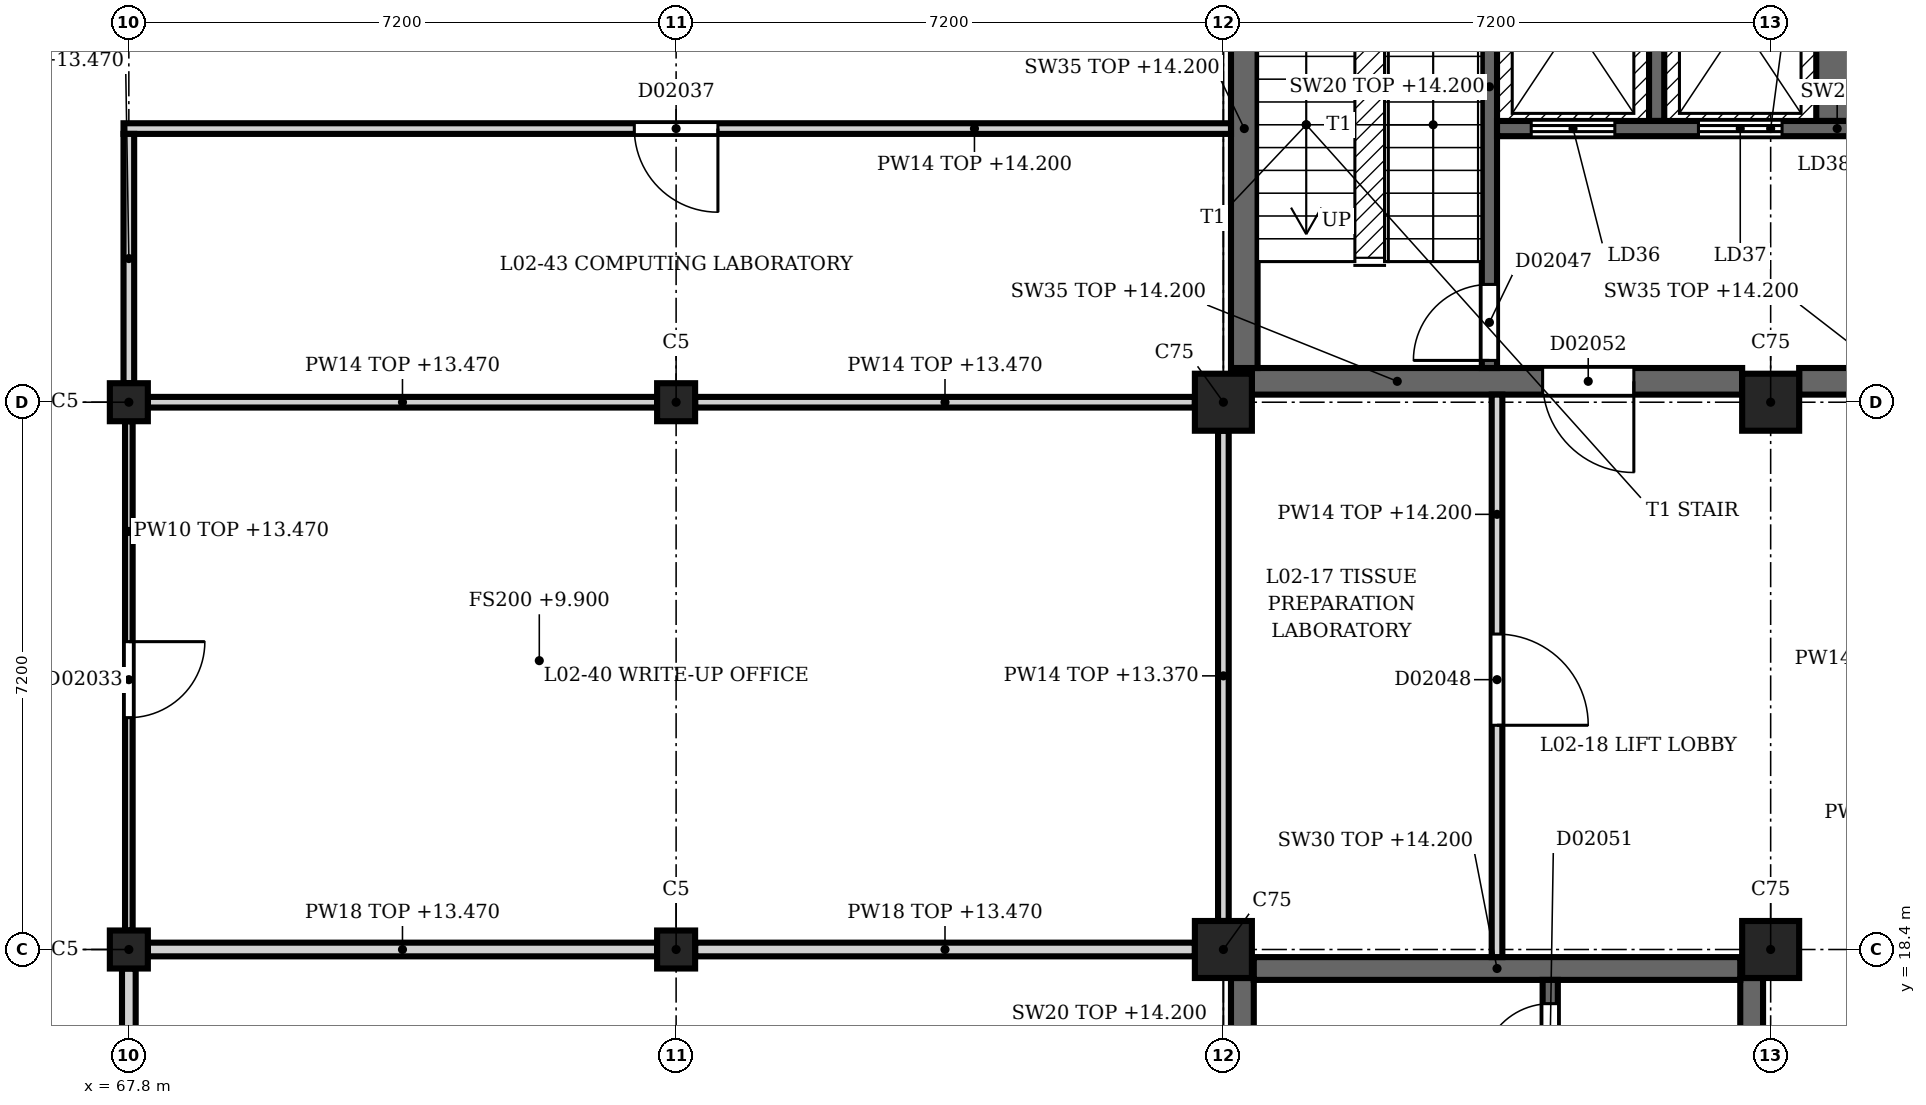
"""IFC4 building model, lengths in metres.
Left out: names, types, materials, properties, quantities, classifications, styles, units other than length and angle.
Written with IfcOpenShell. Run it as: python <this file> out.ifc"""

import sys

from ifc_helpers import new_model, si_unit, direction, frame, frame_2d, origin, origin_2d, place, context, subcontext, project, spatial, rectangle, extrude, element, fill, save


model = new_model("IFC4")
c1 = context("Model", 3, precision=1e-05, world=origin(), true_north=direction((0.0, 1.0)))
c2 = subcontext(c1, "Body", "Model", "MODEL_VIEW")
j1 = project(units=[si_unit("LENGTHUNIT", "METRE"), si_unit("PLANEANGLEUNIT", "RADIAN")], contexts=[c1])
p1 = place(None, origin())
s1 = spatial("IfcSite", under=j1, at=p1, CompositionType="ELEMENT")
p2 = place(p1, origin())
s2 = spatial("IfcBuilding", under=s1, at=p2, CompositionType="ELEMENT")
p3 = place(p2, frame((0.0, 0.0, 9.9)))
s3 = spatial("IfcBuildingStorey", under=s2, at=p3, CompositionType="ELEMENT", Elevation=9.9)
for number, where, z_axis, x_axis in (
    (1, (82.2, 18.4, 0.0), (0.0, 0.0, 1.0), (1.0, 0.0, 0.0)),
    (2, (82.2, 25.6, 0.0), (0.0, 0.0, 1.0), (1.0, 0.0, 0.0)),
    (3, (89.4, 18.4, 0.0), (0.0, 0.0, 1.0), (1.0, 0.0, 0.0)),
    (4, (89.4, 25.6, 0.0), (0.0, 0.0, 1.0), (1.0, 0.0, 0.0)),
):
    element("IfcColumn", number, at=place(p3, frame(where, z_axis=z_axis, x_axis=x_axis)), inside=s3, PredefinedType="COLUMN", context=c2, shape_type="SweptSolid", body=[
        extrude(rectangle(XDim=0.75, YDim=0.75, at=origin_2d()), origin(), (0.0, 0.0, 1.0), 4.5),
    ])
for number, where, z_axis, x_axis in (
    (5, (67.8, 18.4, 0.0), (0.0, 0.0, 1.0), (1.0, 0.0, 0.0)),
    (6, (67.8, 25.6, 0.0), (0.0, 0.0, 1.0), (1.0, 0.0, 0.0)),
    (7, (75.0, 18.4, 0.0), (0.0, 0.0, 1.0), (1.0, 0.0, 0.0)),
    (8, (75.0, 25.6, 0.0), (0.0, 0.0, 1.0), (1.0, 0.0, 0.0)),
):
    element("IfcColumn", number, at=place(p3, frame(where, z_axis=z_axis, x_axis=x_axis)), inside=s3, PredefinedType="COLUMN", context=c2, shape_type="SweptSolid", body=[
        extrude(rectangle(XDim=0.5, YDim=0.5, at=origin_2d()), origin(), (0.0, 0.0, 1.0), 4.5),
    ])
p4 = place(p3, frame((82.575, 25.875, 0.0), z_axis=(0.0, 0.0, 1.0), x_axis=(1.0, 0.0, 0.0)))
e9 = element("IfcWall", 9, at=p4, inside=s3, PredefinedType="SHEAR", context=c2, shape_type="SweptSolid", body=[
    extrude(rectangle(XDim=6.45, YDim=0.35, at=frame_2d((3.225, 0.0))), origin(), (0.0, 0.0, 1.0), 4.3),
])
p5 = place(p4, frame((3.825, 0.0, 0.0)))
e10 = element("IfcOpeningElement", 10, at=p5, cuts=e9, PredefinedType="OPENING", context=c2, shape_type="SweptSolid", body=[
    extrude(rectangle(XDim=1.2, YDim=2.1, at=frame_2d((0.6, 1.05))), frame((0.0, 0.185, 0.0), z_axis=(0.0, -1.0, 0.0), x_axis=(1.0, 0.0, 0.0)), (0.0, 0.0, 1.0), 0.37),
])
p6 = place(p3, frame((89.775, 25.875, 0.0), z_axis=(0.0, 0.0, 1.0), x_axis=(1.0, 0.0, 0.0)))
e11 = element("IfcWall", 11, at=p6, inside=s3, PredefinedType="SHEAR", context=c2, shape_type="SweptSolid", body=[
    extrude(rectangle(XDim=6.45, YDim=0.35, at=frame_2d((3.225, 0.0))), origin(), (0.0, 0.0, 1.0), 4.3),
])
p7 = place(p6, frame((2.625, 0.0, 0.0)))
e12 = element("IfcOpeningElement", 12, at=p7, cuts=e11, PredefinedType="OPENING", context=c2, shape_type="SweptSolid", body=[
    extrude(rectangle(XDim=1.8, YDim=2.1, at=frame_2d((0.9, 1.05))), frame((0.0, 0.185, 0.0), z_axis=(0.0, -1.0, 0.0), x_axis=(1.0, 0.0, 0.0)), (0.0, 0.0, 1.0), 0.37),
])
p8 = place(p3, frame((82.475, 26.05, 0.0), z_axis=(0.0, 0.0, 1.0), x_axis=(0.0, 1.0, 0.0)))
e13 = element("IfcWall", 13, at=p8, inside=s3, PredefinedType="SHEAR", context=c2, shape_type="SweptSolid", body=[
    extrude(rectangle(XDim=6.3, YDim=0.35, at=frame_2d((3.15, 0.0))), origin(), (0.0, 0.0, 1.0), 4.3),
])
p9 = place(p3, frame((85.7, 26.05, 0.0), z_axis=(0.0, 0.0, 1.0), x_axis=(0.0, 1.0, 0.0)))
e14 = element("IfcWall", 14, at=p9, inside=s3, PredefinedType="SHEAR", context=c2, shape_type="SweptSolid", body=[
    extrude(rectangle(XDim=6.3, YDim=0.2, at=frame_2d((3.15, 0.0))), origin(), (0.0, 0.0, 1.0), 4.3),
])
p10 = place(p9, frame((0.1, 0.0, 0.0)))
e15 = element("IfcOpeningElement", 15, at=p10, cuts=e14, PredefinedType="OPENING", context=c2, shape_type="SweptSolid", body=[
    extrude(rectangle(XDim=1.0, YDim=2.1, at=frame_2d((0.5, 1.05))), frame((0.0, 0.11, 0.0), z_axis=(0.0, -1.0, 0.0), x_axis=(1.0, 0.0, 0.0)), (0.0, 0.0, 1.0), 0.22),
])
p11 = place(p3, frame((96.15, 29.2, 0.0), z_axis=(0.0, 0.0, 1.0), x_axis=(-1.0, 0.0, 0.0)))
e16 = element("IfcWall", 16, at=p11, inside=s3, PredefinedType="SHEAR", context=c2, shape_type="SweptSolid", body=[
    extrude(rectangle(XDim=10.35, YDim=0.2, at=frame_2d((5.175, 0.0))), origin(), (0.0, 0.0, 1.0), 4.3),
])
p12 = place(p11, frame((8.8, 0.0, 0.0)))
e17 = element("IfcOpeningElement", 17, at=p12, cuts=e16, PredefinedType="OPENING", context=c2, shape_type="SweptSolid", body=[
    extrude(rectangle(XDim=1.1, YDim=2.1, at=frame_2d((0.55, 1.05))), frame((0.0, 0.11, 0.0), z_axis=(0.0, -1.0, 0.0), x_axis=(1.0, 0.0, 0.0)), (0.0, 0.0, 1.0), 0.22),
])
p13 = place(p11, frame((6.6, 0.0, 0.0)))
e18 = element("IfcOpeningElement", 18, at=p13, cuts=e16, PredefinedType="OPENING", context=c2, shape_type="SweptSolid", body=[
    extrude(rectangle(XDim=1.1, YDim=2.1, at=frame_2d((0.55, 1.05))), frame((0.0, 0.11, 0.0), z_axis=(0.0, -1.0, 0.0), x_axis=(1.0, 0.0, 0.0)), (0.0, 0.0, 1.0), 0.22),
])
p14 = place(p11, frame((3.75, 0.0, 0.0)))
e19 = element("IfcOpeningElement", 19, at=p14, cuts=e16, PredefinedType="OPENING", context=c2, shape_type="SweptSolid", body=[
    extrude(rectangle(XDim=1.4, YDim=2.1, at=frame_2d((0.7, 1.05))), frame((0.0, 0.11, 0.0), z_axis=(0.0, -1.0, 0.0), x_axis=(1.0, 0.0, 0.0)), (0.0, 0.0, 1.0), 0.22),
])
p15 = place(p11, frame((1.962, 0.0, 0.0)))
e20 = element("IfcOpeningElement", 20, at=p15, cuts=e16, PredefinedType="OPENING", context=c2, shape_type="SweptSolid", body=[
    extrude(rectangle(XDim=0.9, YDim=2.1, at=frame_2d((0.45, 1.05))), frame((0.0, 0.11, 0.0), z_axis=(0.0, -1.0, 0.0), x_axis=(1.0, 0.0, 0.0)), (0.0, 0.0, 1.0), 0.22),
])
p16 = place(p11, frame((0.288, 0.0, 0.0)))
e21 = element("IfcOpeningElement", 21, at=p16, cuts=e16, PredefinedType="OPENING", context=c2, shape_type="SweptSolid", body=[
    extrude(rectangle(XDim=0.9, YDim=2.1, at=frame_2d((0.45, 1.05))), frame((0.0, 0.11, 0.0), z_axis=(0.0, -1.0, 0.0), x_axis=(1.0, 0.0, 0.0)), (0.0, 0.0, 1.0), 0.22),
])
p17 = place(p3, frame((87.9, 29.3, 0.0), z_axis=(0.0, 0.0, 1.0), x_axis=(0.0, 1.0, 0.0)))
e22 = element("IfcWall", 22, at=p17, inside=s3, PredefinedType="SHEAR", context=c2, shape_type="SweptSolid", body=[
    extrude(rectangle(XDim=3.05, YDim=0.2, at=frame_2d((1.525, 0.0))), origin(), (0.0, 0.0, 1.0), 4.3),
])
p18 = place(p3, frame((90.3, 29.3, 0.0), z_axis=(0.0, 0.0, 1.0), x_axis=(0.0, 1.0, 0.0)))
e23 = element("IfcWall", 23, at=p18, inside=s3, PredefinedType="SHEAR", context=c2, shape_type="SweptSolid", body=[
    extrude(rectangle(XDim=3.05, YDim=0.6, at=frame_2d((1.525, 0.0))), origin(), (0.0, 0.0, 1.0), 4.3),
])
p19 = place(p3, frame((89.15, 11.575, 0.0), z_axis=(0.0, 0.0, 1.0), x_axis=(0.0, 1.0, 0.0)))
e24 = element("IfcWall", 24, at=p19, inside=s3, PredefinedType="SHEAR", context=c2, shape_type="SweptSolid", body=[
    extrude(rectangle(XDim=6.45, YDim=0.3, at=frame_2d((3.225, 0.0))), origin(), (0.0, 0.0, 1.0), 4.3),
])
p20 = place(p19, frame((4.225, 0.0, 0.0)))
e25 = element("IfcOpeningElement", 25, at=p20, cuts=e24, PredefinedType="OPENING", context=c2, shape_type="SweptSolid", body=[
    extrude(rectangle(XDim=1.2, YDim=2.1, at=frame_2d((0.6, 1.05))), frame((0.0, 0.16, 0.0), z_axis=(0.0, -1.0, 0.0), x_axis=(1.0, 0.0, 0.0)), (0.0, 0.0, 1.0), 0.32),
])
p21 = place(p3, frame((82.45, 11.575, 0.0), z_axis=(0.0, 0.0, 1.0), x_axis=(0.0, 1.0, 0.0)))
e26 = element("IfcWall", 26, at=p21, inside=s3, PredefinedType="SHEAR", context=c2, shape_type="SweptSolid", body=[
    extrude(rectangle(XDim=6.45, YDim=0.3, at=frame_2d((3.225, 0.0))), origin(), (0.0, 0.0, 1.0), 4.3),
])
p22 = place(p3, frame((82.6, 18.15, 0.0), z_axis=(0.0, 0.0, 1.0), x_axis=(1.0, 0.0, 0.0)))
e27 = element("IfcWall", 27, at=p22, inside=s3, PredefinedType="SHEAR", context=c2, shape_type="SweptSolid", body=[
    extrude(rectangle(XDim=6.4, YDim=0.3, at=frame_2d((3.2, 0.0))), origin(), (0.0, 0.0, 1.0), 4.3),
])
p23 = place(p3, frame((86.5, 18.0, 0.0), z_axis=(0.0, 0.0, 1.0), x_axis=(0.0, -1.0, 0.0)))
e28 = element("IfcWall", 28, at=p23, inside=s3, PredefinedType="SHEAR", context=c2, shape_type="SweptSolid", body=[
    extrude(rectangle(XDim=3.25, YDim=0.2, at=frame_2d((1.625, 0.0))), origin(), (0.0, 0.0, 1.0), 4.3),
])
p24 = place(p23, frame((2.038, 0.0, 0.0)))
e29 = element("IfcOpeningElement", 29, at=p24, cuts=e28, PredefinedType="OPENING", context=c2, shape_type="SweptSolid", body=[
    extrude(rectangle(XDim=0.9, YDim=2.1, at=frame_2d((0.45, 1.05))), frame((0.0, 0.11, 0.0), z_axis=(0.0, -1.0, 0.0), x_axis=(1.0, 0.0, 0.0)), (0.0, 0.0, 1.0), 0.22),
])
p25 = place(p23, frame((0.312, 0.0, 0.0)))
e30 = element("IfcOpeningElement", 30, at=p25, cuts=e28, PredefinedType="OPENING", context=c2, shape_type="SweptSolid", body=[
    extrude(rectangle(XDim=0.9, YDim=2.1, at=frame_2d((0.45, 1.05))), frame((0.0, 0.11, 0.0), z_axis=(0.0, -1.0, 0.0), x_axis=(1.0, 0.0, 0.0)), (0.0, 0.0, 1.0), 0.22),
])
p26 = place(p3, frame((68.05, 18.4, 0.0), z_axis=(0.0, 0.0, 1.0), x_axis=(1.0, 0.0, 0.0)))
e31 = element("IfcWall", 31, at=p26, inside=s3, PredefinedType="PARTITIONING", context=c2, shape_type="SweptSolid", body=[
    extrude(rectangle(XDim=6.7, YDim=0.18, at=frame_2d((3.35, 0.0))), origin(), (0.0, 0.0, 1.0), 3.57),
])
p27 = place(p3, frame((75.25, 18.4, 0.0), z_axis=(0.0, 0.0, 1.0), x_axis=(1.0, 0.0, 0.0)))
e32 = element("IfcWall", 32, at=p27, inside=s3, PredefinedType="PARTITIONING", context=c2, shape_type="SweptSolid", body=[
    extrude(rectangle(XDim=6.575, YDim=0.18, at=frame_2d((3.288, 0.0))), origin(), (0.0, 0.0, 1.0), 3.57),
])
p28 = place(p3, frame((68.05, 25.6, 0.0), z_axis=(0.0, 0.0, 1.0), x_axis=(1.0, 0.0, 0.0)))
e33 = element("IfcWall", 33, at=p28, inside=s3, PredefinedType="PARTITIONING", context=c2, shape_type="SweptSolid", body=[
    extrude(rectangle(XDim=6.7, YDim=0.14, at=frame_2d((3.35, 0.0))), origin(), (0.0, 0.0, 1.0), 3.57),
])
p29 = place(p3, frame((75.25, 25.6, 0.0), z_axis=(0.0, 0.0, 1.0), x_axis=(1.0, 0.0, 0.0)))
e34 = element("IfcWall", 34, at=p29, inside=s3, PredefinedType="PARTITIONING", context=c2, shape_type="SweptSolid", body=[
    extrude(rectangle(XDim=6.575, YDim=0.14, at=frame_2d((3.288, 0.0))), origin(), (0.0, 0.0, 1.0), 3.57),
])
p30 = place(p3, frame((82.3, 29.2, 0.0), z_axis=(0.0, 0.0, 1.0), x_axis=(-1.0, 0.0, 0.0)))
e35 = element("IfcWall", 35, at=p30, inside=s3, PredefinedType="PARTITIONING", context=c2, shape_type="SweptSolid", body=[
    extrude(rectangle(XDim=14.57, YDim=0.14, at=frame_2d((7.285, 0.0))), origin(), (0.0, 0.0, 1.0), 4.3),
])
p31 = place(p30, frame((6.75, 0.0, 0.0)))
e36 = element("IfcOpeningElement", 36, at=p31, cuts=e35, PredefinedType="OPENING", context=c2, shape_type="SweptSolid", body=[
    extrude(rectangle(XDim=1.1, YDim=2.2, at=frame_2d((0.55, 1.1))), frame((0.0, 0.08, 0.0), z_axis=(0.0, -1.0, 0.0), x_axis=(1.0, 0.0, 0.0)), (0.0, 0.0, 1.0), 0.16),
])
p32 = place(p3, frame((67.8, 18.15, 0.0), z_axis=(0.0, 0.0, 1.0), x_axis=(0.0, -1.0, 0.0)))
e37 = element("IfcWall", 37, at=p32, inside=s3, PredefinedType="PARTITIONING", context=c2, shape_type="SweptSolid", body=[
    extrude(rectangle(XDim=3.26, YDim=0.18, at=frame_2d((1.63, 0.0))), origin(), (0.0, 0.0, 1.0), 3.57),
])
p33 = place(p32, frame((1.0, 0.0, 0.0)))
e38 = element("IfcOpeningElement", 38, at=p33, cuts=e37, PredefinedType="OPENING", context=c2, shape_type="SweptSolid", body=[
    extrude(rectangle(XDim=1.1, YDim=2.3, at=frame_2d((0.55, 1.15))), frame((0.0, 0.1, 0.0), z_axis=(0.0, -1.0, 0.0), x_axis=(1.0, 0.0, 0.0)), (0.0, 0.0, 1.0), 0.2),
])
p34 = place(p3, frame((67.8, 25.35, 0.0), z_axis=(0.0, 0.0, 1.0), x_axis=(0.0, -1.0, 0.0)))
e39 = element("IfcWall", 39, at=p34, inside=s3, PredefinedType="PARTITIONING", context=c2, shape_type="SweptSolid", body=[
    extrude(rectangle(XDim=6.7, YDim=0.1, at=frame_2d((3.35, 0.0))), origin(), (0.0, 0.0, 1.0), 3.57),
])
p35 = place(p34, frame((2.9, 0.0, 0.0)))
e40 = element("IfcOpeningElement", 40, at=p35, cuts=e39, PredefinedType="OPENING", context=c2, shape_type="SweptSolid", body=[
    extrude(rectangle(XDim=1.0, YDim=2.1, at=frame_2d((0.5, 1.05))), frame((0.0, 0.06, 0.0), z_axis=(0.0, -1.0, 0.0), x_axis=(1.0, 0.0, 0.0)), (0.0, 0.0, 1.0), 0.12),
])
p36 = place(p3, frame((67.8, 25.85, 0.0), z_axis=(0.0, 0.0, 1.0), x_axis=(0.0, 1.0, 0.0)))
e41 = element("IfcWall", 41, at=p36, inside=s3, PredefinedType="PARTITIONING", context=c2, shape_type="SweptSolid", body=[
    extrude(rectangle(XDim=3.28, YDim=0.14, at=frame_2d((1.64, 0.0))), origin(), (0.0, 0.0, 1.0), 3.57),
])
p37 = place(p3, frame((82.2, 18.775, 0.0), z_axis=(0.0, 0.0, 1.0), x_axis=(0.0, 1.0, 0.0)))
e42 = element("IfcWall", 42, at=p37, inside=s3, PredefinedType="PARTITIONING", context=c2, shape_type="SweptSolid", body=[
    extrude(rectangle(XDim=6.45, YDim=0.14, at=frame_2d((3.225, 0.0))), origin(), (0.0, 0.0, 1.0), 3.47),
])
p38 = place(p3, frame((85.8, 18.3, 0.0), z_axis=(0.0, 0.0, 1.0), x_axis=(0.0, 1.0, 0.0)))
e43 = element("IfcWall", 43, at=p38, inside=s3, PredefinedType="PARTITIONING", context=c2, shape_type="SweptSolid", body=[
    extrude(rectangle(XDim=7.4, YDim=0.14, at=frame_2d((3.7, 0.0))), origin(), (0.0, 0.0, 1.0), 4.3),
])
p39 = place(p38, frame((3.05, 0.0, 0.0)))
e44 = element("IfcOpeningElement", 44, at=p39, cuts=e43, PredefinedType="OPENING", context=c2, shape_type="SweptSolid", body=[
    extrude(rectangle(XDim=1.2, YDim=2.1, at=frame_2d((0.6, 1.05))), frame((0.0, 0.08, 0.0), z_axis=(0.0, -1.0, 0.0), x_axis=(1.0, 0.0, 0.0)), (0.0, 0.0, 1.0), 0.16),
])
p40 = place(p5, origin())
e45 = element("IfcDoor", 45, at=p40, inside=s3, OperationType="SINGLE_SWING_RIGHT", PredefinedType="DOOR", context=c2, shape_type="SweptSolid", body=[
    extrude(rectangle(XDim=1.2, YDim=2.1, at=frame_2d((0.6, 1.05))), frame((0.0, 0.025, 0.0), z_axis=(0.0, -1.0, 0.0), x_axis=(1.0, 0.0, 0.0)), (0.0, 0.0, 1.0), 0.05),
])
fill(e10, e45)
p41 = place(p12, origin())
e46 = element("IfcDoor", 46, at=p41, inside=s3, OperationType="DOUBLE_DOOR_SLIDING", PredefinedType="DOOR", context=c2, shape_type="SweptSolid", body=[
    extrude(rectangle(XDim=1.1, YDim=2.1, at=frame_2d((0.55, 1.05))), frame((0.0, 0.025, 0.0), z_axis=(0.0, -1.0, 0.0), x_axis=(1.0, 0.0, 0.0)), (0.0, 0.0, 1.0), 0.05),
])
fill(e17, e46)
p42 = place(p13, origin())
e47 = element("IfcDoor", 47, at=p42, inside=s3, OperationType="DOUBLE_DOOR_SLIDING", PredefinedType="DOOR", context=c2, shape_type="SweptSolid", body=[
    extrude(rectangle(XDim=1.1, YDim=2.1, at=frame_2d((0.55, 1.05))), frame((0.0, 0.025, 0.0), z_axis=(0.0, -1.0, 0.0), x_axis=(1.0, 0.0, 0.0)), (0.0, 0.0, 1.0), 0.05),
])
fill(e18, e47)
p43 = place(p10, origin())
e48 = element("IfcDoor", 48, at=p43, inside=s3, OperationType="SINGLE_SWING_LEFT", PredefinedType="DOOR", context=c2, shape_type="SweptSolid", body=[
    extrude(rectangle(XDim=1.0, YDim=2.1, at=frame_2d((0.5, 1.05))), frame((0.0, 0.025, 0.0), z_axis=(0.0, -1.0, 0.0), x_axis=(1.0, 0.0, 0.0)), (0.0, 0.0, 1.0), 0.05),
])
fill(e15, e48)
p44 = place(p25, origin())
e49 = element("IfcDoor", 49, at=p44, inside=s3, OperationType="SINGLE_SWING_LEFT", PredefinedType="DOOR", context=c2, shape_type="SweptSolid", body=[
    extrude(rectangle(XDim=0.9, YDim=2.1, at=frame_2d((0.45, 1.05))), frame((0.0, 0.025, 0.0), z_axis=(0.0, -1.0, 0.0), x_axis=(1.0, 0.0, 0.0)), (0.0, 0.0, 1.0), 0.05),
])
fill(e30, e49)
p45 = place(p31, origin())
e50 = element("IfcDoor", 50, at=p45, inside=s3, OperationType="SINGLE_SWING_RIGHT", PredefinedType="DOOR", context=c2, shape_type="SweptSolid", body=[
    extrude(rectangle(XDim=1.1, YDim=2.2, at=frame_2d((0.55, 1.1))), frame((0.0, 0.025, 0.0), z_axis=(0.0, -1.0, 0.0), x_axis=(1.0, 0.0, 0.0)), (0.0, 0.0, 1.0), 0.05),
])
fill(e36, e50)
p46 = place(p35, origin())
e51 = element("IfcDoor", 51, at=p46, inside=s3, OperationType="SINGLE_SWING_RIGHT", PredefinedType="DOOR", context=c2, shape_type="SweptSolid", body=[
    extrude(rectangle(XDim=1.0, YDim=2.1, at=frame_2d((0.5, 1.05))), frame((0.0, 0.025, 0.0), z_axis=(0.0, -1.0, 0.0), x_axis=(1.0, 0.0, 0.0)), (0.0, 0.0, 1.0), 0.05),
])
fill(e40, e51)
p47 = place(p39, origin())
e52 = element("IfcDoor", 52, at=p47, inside=s3, OperationType="SINGLE_SWING_LEFT", PredefinedType="DOOR", context=c2, shape_type="SweptSolid", body=[
    extrude(rectangle(XDim=1.2, YDim=2.1, at=frame_2d((0.6, 1.05))), frame((0.0, 0.025, 0.0), z_axis=(0.0, -1.0, 0.0), x_axis=(1.0, 0.0, 0.0)), (0.0, 0.0, 1.0), 0.05),
])
fill(e44, e52)
save(model, sys.argv[1])
